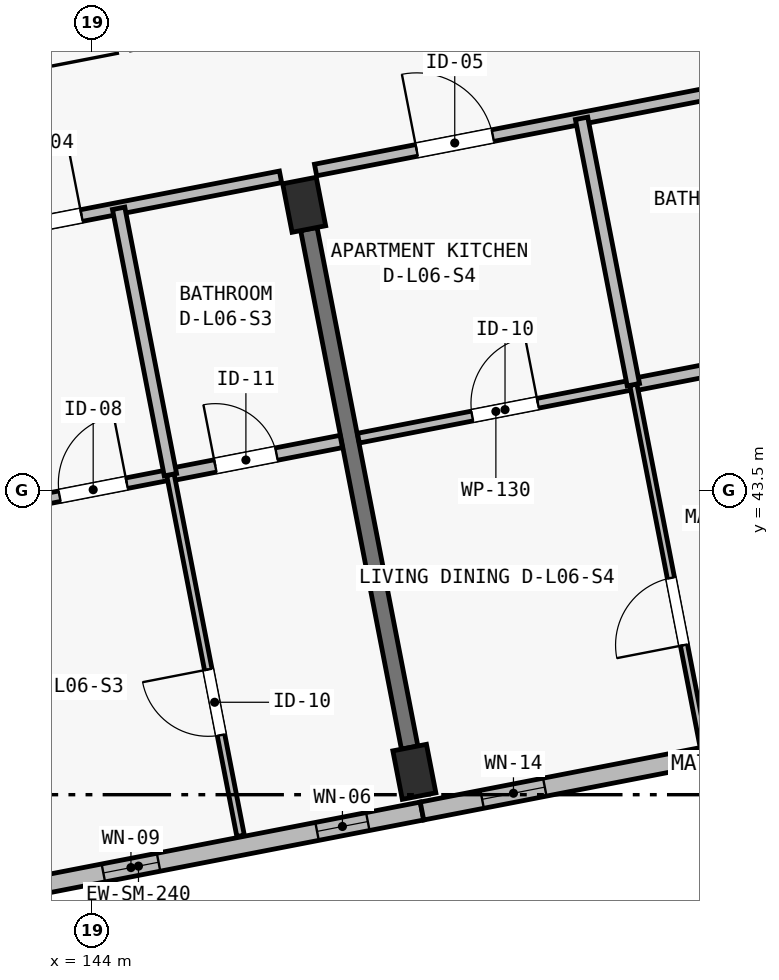
"""IFC4 building model, lengths in metres.
Left out: names, types, materials, properties, quantities, classifications, styles, units other than length and angle.
Written with IfcOpenShell. Run it as: python <this file> out.ifc"""

import sys

from ifc_helpers import new_model, si_unit, direction, frame, frame_2d, origin, origin_2d, place, context, subcontext, project, spatial, rectangle, extrude, element, fill, save


model = new_model("IFC4")
c1 = context("Model", 3, precision=1e-05, world=origin(), true_north=direction((0.0, 1.0)))
c2 = subcontext(c1, "Body", "Model", "MODEL_VIEW")
j1 = project(units=[si_unit("LENGTHUNIT", "METRE"), si_unit("PLANEANGLEUNIT", "RADIAN")], contexts=[c1])
p1 = place(None, origin())
s1 = spatial("IfcSite", under=j1, at=p1, CompositionType="ELEMENT")
p2 = place(p1, origin())
s2 = spatial("IfcBuilding", under=s1, at=p2, CompositionType="ELEMENT")
p3 = place(p2, frame((0.0, 0.0, 21.4)))
s3 = spatial("IfcBuildingStorey", under=s2, at=p3, CompositionType="ELEMENT", Elevation=21.4)
for number, where, z_axis, x_axis in (
    (1, (148.241, 39.801, 0.0), (0.0, 0.0, 1.0), (0.982, 0.191, 0.0)),
    (2, (146.791, 47.261, 0.0), (0.0, 0.0, 1.0), (0.982, 0.191, 0.0)),
):
    element("IfcColumn", number, at=place(p3, frame(where, z_axis=z_axis, x_axis=x_axis)), inside=s3, PredefinedType="COLUMN", context=c2, shape_type="SweptSolid", body=[
        extrude(rectangle(XDim=0.45, YDim=0.65, at=origin_2d()), origin(), (0.0, 0.0, 1.0), 3.25),
    ])
p4 = place(p3, frame((148.179, 40.12, 0.0), z_axis=(0.0, 0.0, 1.0), x_axis=(-0.190817005532, 0.981625626397, 0.0)))
e3 = element("IfcWall", 3, at=p4, inside=s3, PredefinedType="SHEAR", context=c2, shape_type="SweptSolid", body=[
    extrude(rectangle(XDim=6.95, YDim=0.22, at=frame_2d((3.475, 0.0))), origin(), (0.0, 0.0, 1.0), 2.5),
])
p5 = place(p3, frame((148.342, 39.285, 0.0), z_axis=(0.0, 0.0, 1.0), x_axis=(-0.981631269434, -0.190787973596, 0.0)))
e4 = element("IfcWall", 4, at=p5, inside=s3, PredefinedType="SOLIDWALL", context=c2, shape_type="SweptSolid", body=[
    extrude(rectangle(XDim=7.6, YDim=0.24, at=frame_2d((3.8, 0.0))), origin(), (0.0, 0.0, 1.0), 3.0),
])
p6 = place(p5, frame((0.726, 0.0, 0.42)))
e5 = element("IfcOpeningElement", 5, at=p6, cuts=e4, PredefinedType="OPENING", context=c2, shape_type="SweptSolid", body=[
    extrude(rectangle(XDim=0.68, YDim=2.24, at=frame_2d((0.34, 1.12))), frame((0.0, 0.135, 0.0), z_axis=(0.0, -1.0, 0.0), x_axis=(1.0, 0.0, 0.0)), (0.0, 0.0, 1.0), 0.27),
])
p7 = place(p5, frame((3.531, 0.0, 0.42)))
e6 = element("IfcOpeningElement", 6, at=p7, cuts=e4, PredefinedType="OPENING", context=c2, shape_type="SweptSolid", body=[
    extrude(rectangle(XDim=0.74, YDim=2.26, at=frame_2d((0.37, 1.13))), frame((0.0, 0.135, 0.0), z_axis=(0.0, -1.0, 0.0), x_axis=(1.0, 0.0, 0.0)), (0.0, 0.0, 1.0), 0.27),
])
p8 = place(p3, frame((155.802, 40.735, 0.0), z_axis=(0.0, 0.0, 1.0), x_axis=(-0.981626422232, -0.190812911449, 0.0)))
e7 = element("IfcWall", 7, at=p8, inside=s3, PredefinedType="SOLIDWALL", context=c2, shape_type="SweptSolid", body=[
    extrude(rectangle(XDim=7.6, YDim=0.24, at=frame_2d((3.8, 0.0))), origin(), (0.0, 0.0, 1.0), 3.0),
])
p9 = place(p8, frame((0.61, 0.0, 0.48)))
e8 = element("IfcOpeningElement", 8, at=p9, cuts=e7, PredefinedType="OPENING", context=c2, shape_type="SweptSolid", body=[
    extrude(rectangle(XDim=0.78, YDim=2.2, at=frame_2d((0.39, 1.1))), frame((0.0, 0.135, 0.0), z_axis=(0.0, -1.0, 0.0), x_axis=(1.0, 0.0, 0.0)), (0.0, 0.0, 1.0), 0.27),
])
p10 = place(p8, frame((1.952, 0.0, 0.52)))
e9 = element("IfcOpeningElement", 9, at=p10, cuts=e7, PredefinedType="OPENING", context=c2, shape_type="SweptSolid", body=[
    extrude(rectangle(XDim=0.8, YDim=2.3, at=frame_2d((0.4, 1.15))), frame((0.0, 0.135, 0.0), z_axis=(0.0, -1.0, 0.0), x_axis=(1.0, 0.0, 0.0)), (0.0, 0.0, 1.0), 0.27),
])
p11 = place(p8, frame((5.954, 0.0, 0.48)))
e10 = element("IfcOpeningElement", 10, at=p11, cuts=e7, PredefinedType="OPENING", context=c2, shape_type="SweptSolid", body=[
    extrude(rectangle(XDim=0.84, YDim=2.28, at=frame_2d((0.42, 1.14))), frame((0.0, 0.135, 0.0), z_axis=(0.0, -1.0, 0.0), x_axis=(1.0, 0.0, 0.0)), (0.0, 0.0, 1.0), 0.27),
])
p12 = place(p3, frame((142.451, 46.845, 0.0), z_axis=(0.0, 0.0, 1.0), x_axis=(0.981629934904, 0.190794839817, 0.0)))
e11 = element("IfcWall", 11, at=p12, inside=s3, PredefinedType="PARTITIONING", context=c2, shape_type="SweptSolid", body=[
    extrude(rectangle(XDim=4.105, YDim=0.155, at=frame_2d((2.052, 0.0))), origin(), (0.0, 0.0, 1.0), 2.97),
])
p13 = place(p12, frame((0.458, 0.0, 0.0)))
e12 = element("IfcOpeningElement", 12, at=p13, cuts=e11, PredefinedType="OPENING", context=c2, shape_type="SweptSolid", body=[
    extrude(rectangle(XDim=0.98, YDim=2.15, at=frame_2d((0.49, 1.075))), frame((0.0, 0.093, 0.0), z_axis=(0.0, -1.0, 0.0), x_axis=(1.0, 0.0, 0.0)), (0.0, 0.0, 1.0), 0.185),
])
p14 = place(p3, frame((140.045, 42.741, 0.0), z_axis=(0.0, 0.0, 1.0), x_axis=(0.981629144122, 0.190798908307, 0.0)))
e13 = element("IfcWall", 13, at=p14, inside=s3, PredefinedType="PARTITIONING", context=c2, shape_type="SweptSolid", body=[
    extrude(rectangle(XDim=5.08, YDim=0.14, at=frame_2d((2.54, 0.0))), origin(), (0.0, 0.0, 1.0), 2.97),
])
p15 = place(p14, frame((3.595, 0.0, 0.0)))
e14 = element("IfcOpeningElement", 14, at=p15, cuts=e13, PredefinedType="OPENING", context=c2, shape_type="SweptSolid", body=[
    extrude(rectangle(XDim=0.9, YDim=2.1, at=frame_2d((0.45, 1.05))), frame((0.0, 0.085, 0.0), z_axis=(0.0, -1.0, 0.0), x_axis=(1.0, 0.0, 0.0)), (0.0, 0.0, 1.0), 0.17),
])
p16 = place(p3, frame((145.031, 43.71, 0.0), z_axis=(0.0, 0.0, 1.0), x_axis=(0.981624265801, 0.190824004755, 0.0)))
e15 = element("IfcWall", 15, at=p16, inside=s3, PredefinedType="PLUMBINGWALL", context=c2, shape_type="SweptSolid", body=[
    extrude(rectangle(XDim=2.29, YDim=0.165, at=frame_2d((1.145, 0.0))), origin(), (0.0, 0.0, 1.0), 2.97),
])
p17 = place(p16, frame((0.602, 0.0, 0.0)))
e16 = element("IfcOpeningElement", 16, at=p17, cuts=e15, PredefinedType="OPENING", context=c2, shape_type="SweptSolid", body=[
    extrude(rectangle(XDim=0.82, YDim=2.08, at=frame_2d((0.41, 1.04))), frame((0.0, 0.097, 0.0), z_axis=(0.0, -1.0, 0.0), x_axis=(1.0, 0.0, 0.0)), (0.0, 0.0, 1.0), 0.195),
])
p18 = place(p3, frame((145.955, 38.959, 0.0), z_axis=(0.0, 0.0, 1.0), x_axis=(-0.190826454074, 0.98162378966, 0.0)))
e17 = element("IfcWall", 17, at=p18, inside=s3, PredefinedType="PARTITIONING", context=c2, shape_type="SweptSolid", body=[
    extrude(rectangle(XDim=4.84, YDim=0.1, at=frame_2d((2.42, 0.0))), origin(), (0.0, 0.0, 1.0), 2.97),
])
p19 = place(p18, frame((1.35, 0.0, 0.0)))
e18 = element("IfcOpeningElement", 18, at=p19, cuts=e17, PredefinedType="OPENING", context=c2, shape_type="SweptSolid", body=[
    extrude(rectangle(XDim=0.88, YDim=2.1, at=frame_2d((0.44, 1.05))), frame((0.0, 0.065, 0.0), z_axis=(0.0, -1.0, 0.0), x_axis=(1.0, 0.0, 0.0)), (0.0, 0.0, 1.0), 0.13),
])
p20 = place(p3, frame((145.031, 43.71, 0.0), z_axis=(0.0, 0.0, 1.0), x_axis=(-0.190800102044, 0.981628912095, 0.0)))
e19 = element("IfcWall", 19, at=p20, inside=s3, PredefinedType="PLUMBINGWALL", context=c2, shape_type="SweptSolid", body=[
    extrude(rectangle(XDim=3.57, YDim=0.165, at=frame_2d((1.785, 0.0))), origin(), (0.0, 0.0, 1.0), 2.97),
])
p21 = place(p3, frame((146.942, 47.718, 0.0), z_axis=(0.0, 0.0, 1.0), x_axis=(0.981623942594, 0.190825667367, 0.0)))
e20 = element("IfcWall", 20, at=p21, inside=s3, PredefinedType="PARTITIONING", context=c2, shape_type="SweptSolid", body=[
    extrude(rectangle(XDim=7.13, YDim=0.155, at=frame_2d((3.565, 0.0))), origin(), (0.0, 0.0, 1.0), 2.97),
])
p22 = place(p21, frame((1.355, 0.0, 0.0)))
e21 = element("IfcOpeningElement", 21, at=p22, cuts=e20, PredefinedType="OPENING", context=c2, shape_type="SweptSolid", body=[
    extrude(rectangle(XDim=1.02, YDim=2.2, at=frame_2d((0.51, 1.1))), frame((0.0, 0.093, 0.0), z_axis=(0.0, -1.0, 0.0), x_axis=(1.0, 0.0, 0.0)), (0.0, 0.0, 1.0), 0.185),
])
p23 = place(p3, frame((147.505, 44.191, 0.0), z_axis=(0.0, 0.0, 1.0), x_axis=(0.981626422232, 0.190812911449, 0.0)))
e22 = element("IfcWall", 22, at=p23, inside=s3, PredefinedType="PARTITIONING", context=c2, shape_type="SweptSolid", body=[
    extrude(rectangle(XDim=3.685, YDim=0.13, at=frame_2d((1.842, 0.0))), origin(), (0.0, 0.0, 1.0), 2.97),
])
p24 = place(p23, frame((1.525, 0.0, 0.0)))
e23 = element("IfcOpeningElement", 23, at=p24, cuts=e22, PredefinedType="OPENING", context=c2, shape_type="SweptSolid", body=[
    extrude(rectangle(XDim=0.88, YDim=2.1, at=frame_2d((0.44, 1.05))), frame((0.0, 0.08, 0.0), z_axis=(0.0, -1.0, 0.0), x_axis=(1.0, 0.0, 0.0)), (0.0, 0.0, 1.0), 0.16),
])
p25 = place(p3, frame((151.123, 44.894, 0.0), z_axis=(0.0, 0.0, 1.0), x_axis=(0.981626422232, 0.190812911449, 0.0)))
e24 = element("IfcWall", 24, at=p25, inside=s3, PredefinedType="PLUMBINGWALL", context=c2, shape_type="SweptSolid", body=[
    extrude(rectangle(XDim=3.685, YDim=0.165, at=frame_2d((1.842, 0.0))), origin(), (0.0, 0.0, 1.0), 2.97),
])
p26 = place(p25, frame((1.3, 0.0, 0.0)))
e25 = element("IfcOpeningElement", 25, at=p26, cuts=e24, PredefinedType="OPENING", context=c2, shape_type="SweptSolid", body=[
    extrude(rectangle(XDim=0.82, YDim=2.08, at=frame_2d((0.41, 1.04))), frame((0.0, 0.097, 0.0), z_axis=(0.0, -1.0, 0.0), x_axis=(1.0, 0.0, 0.0)), (0.0, 0.0, 1.0), 0.195),
])
p27 = place(p3, frame((152.046, 40.143, 0.0), z_axis=(0.0, 0.0, 1.0), x_axis=(-0.190826454074, 0.98162378966, 0.0)))
e26 = element("IfcWall", 26, at=p27, inside=s3, PredefinedType="PARTITIONING", context=c2, shape_type="SweptSolid", body=[
    extrude(rectangle(XDim=4.84, YDim=0.095, at=frame_2d((2.42, 0.0))), origin(), (0.0, 0.0, 1.0), 2.97),
])
p28 = place(p27, frame((1.35, 0.0, 0.0)))
e27 = element("IfcOpeningElement", 27, at=p28, cuts=e26, PredefinedType="OPENING", context=c2, shape_type="SweptSolid", body=[
    extrude(rectangle(XDim=0.9, YDim=2.1, at=frame_2d((0.45, 1.05))), frame((0.0, 0.062, 0.0), z_axis=(0.0, -1.0, 0.0), x_axis=(1.0, 0.0, 0.0)), (0.0, 0.0, 1.0), 0.125),
])
p29 = place(p3, frame((151.123, 44.894, 0.0), z_axis=(0.0, 0.0, 1.0), x_axis=(-0.190787294327, 0.981631401455, 0.0)))
e28 = element("IfcWall", 28, at=p29, inside=s3, PredefinedType="PLUMBINGWALL", context=c2, shape_type="SweptSolid", body=[
    extrude(rectangle(XDim=3.57, YDim=0.165, at=frame_2d((1.785, 0.0))), origin(), (0.0, 0.0, 1.0), 2.97),
])
p30 = place(p6, origin())
e29 = element("IfcWindow", 29, at=p30, inside=s3, PartitioningType="SINGLE_PANEL", PredefinedType="WINDOW", context=c2, shape_type="SweptSolid", body=[
    extrude(rectangle(XDim=0.68, YDim=2.24, at=frame_2d((0.34, 1.12))), frame((0.0, 0.03, 0.0), z_axis=(0.0, -1.0, 0.0), x_axis=(1.0, 0.0, 0.0)), (0.0, 0.0, 1.0), 0.06),
])
fill(e5, e29)
p31 = place(p7, origin())
e30 = element("IfcWindow", 30, at=p31, inside=s3, PartitioningType="SINGLE_PANEL", PredefinedType="WINDOW", context=c2, shape_type="SweptSolid", body=[
    extrude(rectangle(XDim=0.74, YDim=2.26, at=frame_2d((0.37, 1.13))), frame((0.0, 0.03, 0.0), z_axis=(0.0, -1.0, 0.0), x_axis=(1.0, 0.0, 0.0)), (0.0, 0.0, 1.0), 0.06),
])
fill(e6, e30)
p32 = place(p11, origin())
e31 = element("IfcWindow", 31, at=p32, inside=s3, PartitioningType="SINGLE_PANEL", PredefinedType="WINDOW", context=c2, shape_type="SweptSolid", body=[
    extrude(rectangle(XDim=0.84, YDim=2.28, at=frame_2d((0.42, 1.14))), frame((0.0, 0.03, 0.0), z_axis=(0.0, -1.0, 0.0), x_axis=(1.0, 0.0, 0.0)), (0.0, 0.0, 1.0), 0.06),
])
fill(e10, e31)
p33 = place(p13, origin())
e32 = element("IfcDoor", 32, at=p33, inside=s3, OperationType="SINGLE_SWING_RIGHT", PredefinedType="DOOR", context=c2, shape_type="SweptSolid", body=[
    extrude(rectangle(XDim=0.98, YDim=2.15, at=frame_2d((0.49, 1.075))), frame((0.0, 0.025, 0.0), z_axis=(0.0, -1.0, 0.0), x_axis=(1.0, 0.0, 0.0)), (0.0, 0.0, 1.0), 0.05),
])
fill(e12, e32)
p34 = place(p15, origin())
e33 = element("IfcDoor", 33, at=p34, inside=s3, OperationType="SINGLE_SWING_RIGHT", PredefinedType="DOOR", context=c2, shape_type="SweptSolid", body=[
    extrude(rectangle(XDim=0.9, YDim=2.1, at=frame_2d((0.45, 1.05))), frame((0.0, 0.025, 0.0), z_axis=(0.0, -1.0, 0.0), x_axis=(1.0, 0.0, 0.0)), (0.0, 0.0, 1.0), 0.05),
])
fill(e14, e33)
p35 = place(p17, origin())
e34 = element("IfcDoor", 34, at=p35, inside=s3, OperationType="SINGLE_SWING_LEFT", PredefinedType="DOOR", context=c2, shape_type="SweptSolid", body=[
    extrude(rectangle(XDim=0.82, YDim=2.08, at=frame_2d((0.41, 1.04))), frame((0.0, 0.025, 0.0), z_axis=(0.0, -1.0, 0.0), x_axis=(1.0, 0.0, 0.0)), (0.0, 0.0, 1.0), 0.05),
])
fill(e16, e34)
p36 = place(p19, origin())
e35 = element("IfcDoor", 35, at=p36, inside=s3, OperationType="SINGLE_SWING_RIGHT", PredefinedType="DOOR", context=c2, shape_type="SweptSolid", body=[
    extrude(rectangle(XDim=0.88, YDim=2.1, at=frame_2d((0.44, 1.05))), frame((0.0, 0.025, 0.0), z_axis=(0.0, -1.0, 0.0), x_axis=(1.0, 0.0, 0.0)), (0.0, 0.0, 1.0), 0.05),
])
fill(e18, e35)
p37 = place(p22, origin())
e36 = element("IfcDoor", 36, at=p37, inside=s3, OperationType="SINGLE_SWING_LEFT", PredefinedType="DOOR", context=c2, shape_type="SweptSolid", body=[
    extrude(rectangle(XDim=1.02, YDim=2.2, at=frame_2d((0.51, 1.1))), frame((0.0, 0.025, 0.0), z_axis=(0.0, -1.0, 0.0), x_axis=(1.0, 0.0, 0.0)), (0.0, 0.0, 1.0), 0.05),
])
fill(e21, e36)
p38 = place(p24, origin())
e37 = element("IfcDoor", 37, at=p38, inside=s3, OperationType="SINGLE_SWING_RIGHT", PredefinedType="DOOR", context=c2, shape_type="SweptSolid", body=[
    extrude(rectangle(XDim=0.88, YDim=2.1, at=frame_2d((0.44, 1.05))), frame((0.0, 0.025, 0.0), z_axis=(0.0, -1.0, 0.0), x_axis=(1.0, 0.0, 0.0)), (0.0, 0.0, 1.0), 0.05),
])
fill(e23, e37)
p39 = place(p28, origin())
e38 = element("IfcDoor", 38, at=p39, inside=s3, OperationType="SINGLE_SWING_LEFT", PredefinedType="DOOR", context=c2, shape_type="SweptSolid", body=[
    extrude(rectangle(XDim=0.9, YDim=2.1, at=frame_2d((0.45, 1.05))), frame((0.0, 0.025, 0.0), z_axis=(0.0, -1.0, 0.0), x_axis=(1.0, 0.0, 0.0)), (0.0, 0.0, 1.0), 0.05),
])
fill(e27, e38)
save(model, sys.argv[1])
